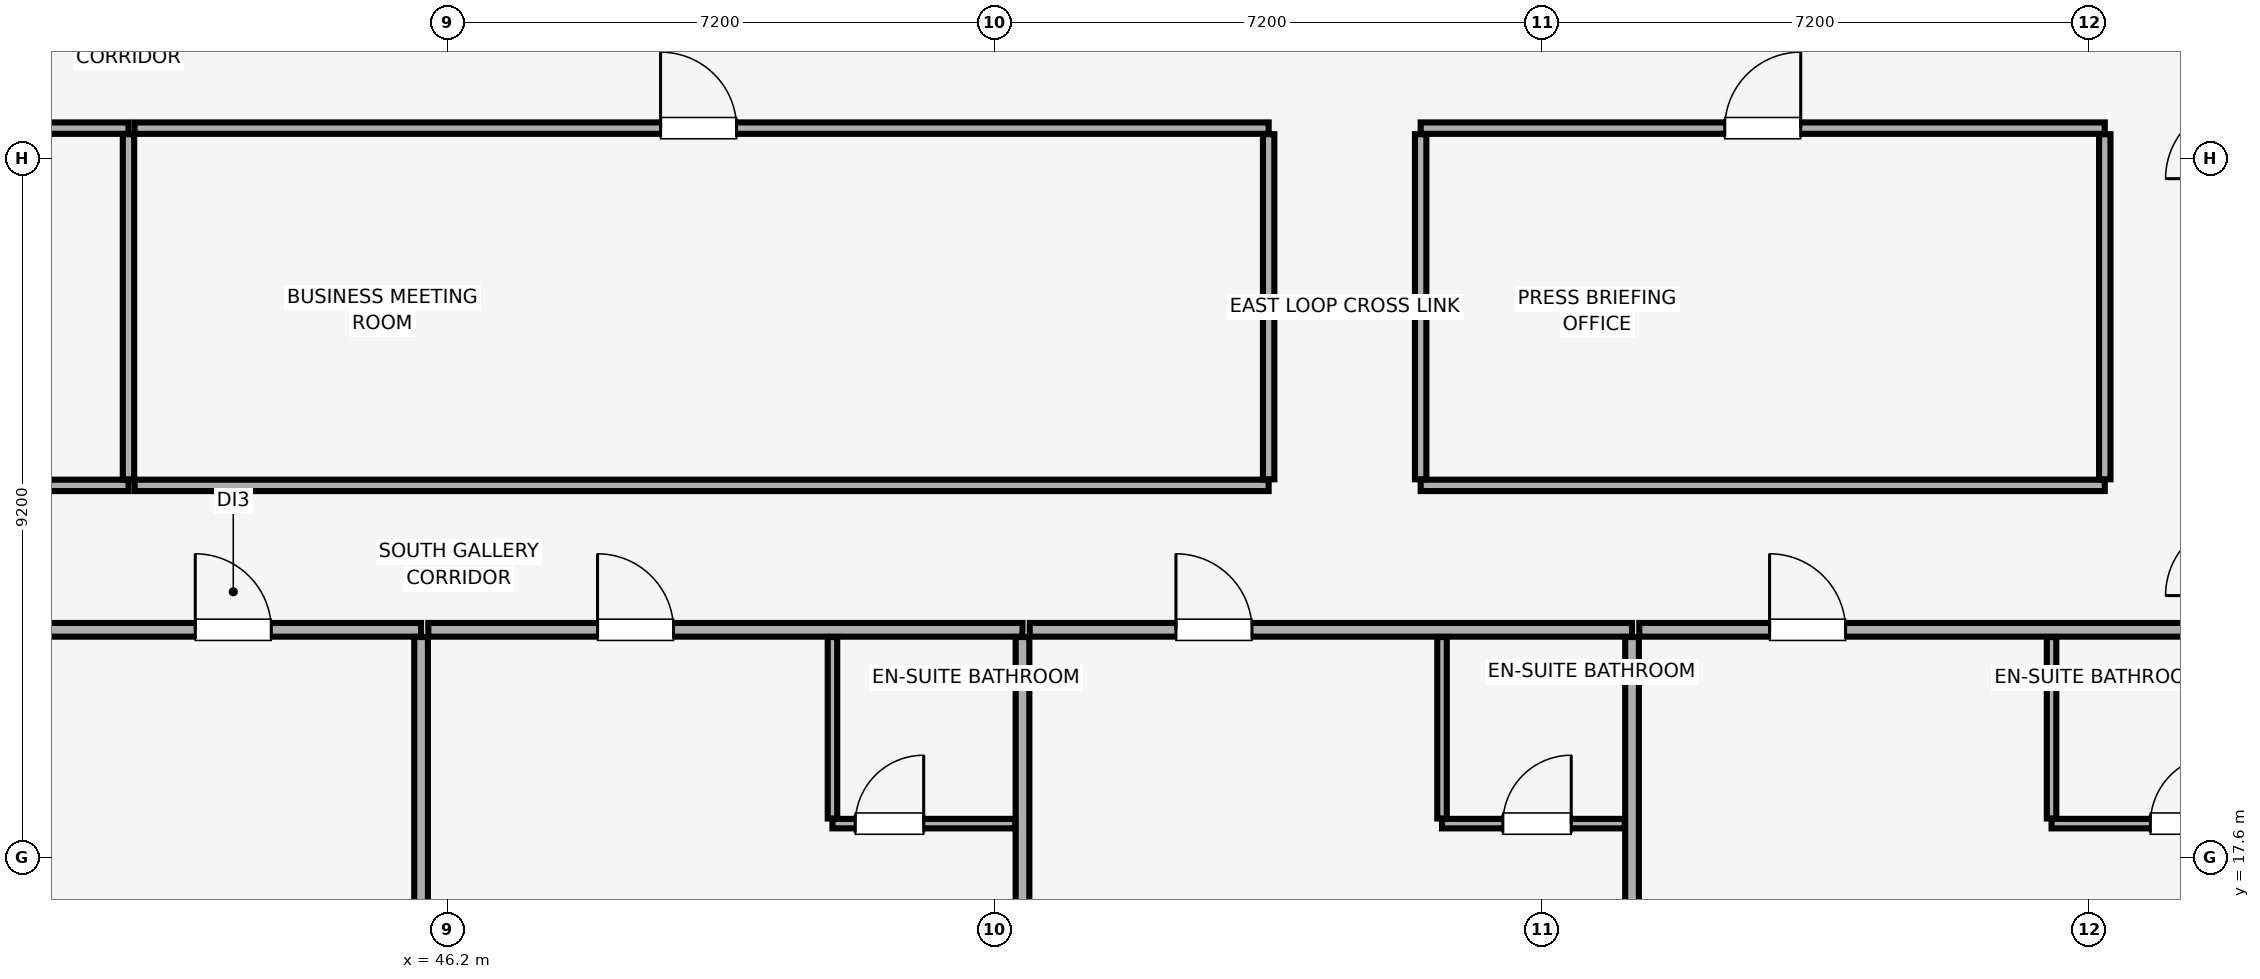
"""IFC4 building model, lengths in metres.
Left out: names, types, materials, properties, quantities, classifications, styles, units other than length and angle.
Written with IfcOpenShell. Run it as: python <this file> out.ifc"""

import sys

from ifc_helpers import new_model, si_unit, direction, frame, frame_2d, origin, place, context, subcontext, project, spatial, rectangle, extrude, element, fill, save


model = new_model("IFC4")
c1 = context("Model", 3, precision=1e-05, world=origin(), true_north=direction((0.0, 1.0)))
c2 = subcontext(c1, "Body", "Model", "MODEL_VIEW")
j1 = project(units=[si_unit("LENGTHUNIT", "METRE"), si_unit("PLANEANGLEUNIT", "RADIAN")], contexts=[c1])
p1 = place(None, origin())
s1 = spatial("IfcSite", under=j1, at=p1, CompositionType="ELEMENT")
p2 = place(p1, origin())
s2 = spatial("IfcBuilding", under=s1, at=p2, CompositionType="ELEMENT")
p3 = place(p2, frame((0.0, 0.0, 180.95)))
s3 = spatial("IfcBuildingStorey", under=s2, at=p3, CompositionType="ELEMENT", Elevation=180.95)
p4 = place(p3, frame((38.032, 20.6, 0.0), z_axis=(0.0, 0.0, 1.0), x_axis=(1.0, 0.0, 0.0)))
e1 = element("IfcWall", 1, at=p4, inside=s3, PredefinedType="PARTITIONING", context=c2, shape_type="SweptSolid", body=[
    extrude(rectangle(XDim=7.817, YDim=0.18, at=frame_2d((3.909, 0.0))), origin(), (0.0, 0.0, 1.0), 3.45),
])
p5 = place(p4, frame((4.847, 0.0, 0.0)))
e2 = element("IfcOpeningElement", 2, at=p5, cuts=e1, PredefinedType="OPENING", context=c2, shape_type="SweptSolid", body=[
    extrude(rectangle(XDim=1.0, YDim=2.15, at=frame_2d((0.5, 1.075))), frame((0.0, 0.1, 0.0), z_axis=(0.0, -1.0, 0.0), x_axis=(1.0, 0.0, 0.0)), (0.0, 0.0, 1.0), 0.2),
])
p6 = place(p3, frame((45.849, 3.15, 0.0), z_axis=(0.0, 0.0, 1.0), x_axis=(0.0, 1.0, 0.0)))
e3 = element("IfcWall", 3, at=p6, inside=s3, PredefinedType="PARTITIONING", context=c2, shape_type="SweptSolid", body=[
    extrude(rectangle(XDim=17.355, YDim=0.18, at=frame_2d((8.677, 0.0))), origin(), (0.0, 0.0, 1.0), 3.45),
])
p7 = place(p3, frame((45.944, 20.6, 0.0), z_axis=(0.0, 0.0, 1.0), x_axis=(1.0, 0.0, 0.0)))
e4 = element("IfcWall", 4, at=p7, inside=s3, PredefinedType="PARTITIONING", context=c2, shape_type="SweptSolid", body=[
    extrude(rectangle(XDim=7.817, YDim=0.18, at=frame_2d((3.909, 0.0))), origin(), (0.0, 0.0, 1.0), 3.45),
])
p8 = place(p7, frame((2.227, 0.0, 0.0)))
e5 = element("IfcOpeningElement", 5, at=p8, cuts=e4, PredefinedType="OPENING", context=c2, shape_type="SweptSolid", body=[
    extrude(rectangle(XDim=1.0, YDim=2.15, at=frame_2d((0.5, 1.075))), frame((0.0, 0.1, 0.0), z_axis=(0.0, -1.0, 0.0), x_axis=(1.0, 0.0, 0.0)), (0.0, 0.0, 1.0), 0.2),
])
p9 = place(p3, frame((53.761, 3.15, 0.0), z_axis=(0.0, 0.0, 1.0), x_axis=(0.0, 1.0, 0.0)))
e6 = element("IfcWall", 6, at=p9, inside=s3, PredefinedType="PARTITIONING", context=c2, shape_type="SweptSolid", body=[
    extrude(rectangle(XDim=17.355, YDim=0.18, at=frame_2d((8.677, 0.0))), origin(), (0.0, 0.0, 1.0), 3.45),
])
p10 = place(p3, frame((51.261, 18.05, 0.0), z_axis=(0.0, 0.0, 1.0), x_axis=(1.0, 0.0, 0.0)))
e7 = element("IfcWall", 7, at=p10, inside=s3, PredefinedType="PARTITIONING", context=c2, shape_type="SweptSolid", body=[
    extrude(rectangle(XDim=2.405, YDim=0.125, at=frame_2d((1.203, 0.0))), origin(), (0.0, 0.0, 1.0), 3.45),
])
p11 = place(p10, frame((0.3, 0.0, 0.0)))
e8 = element("IfcOpeningElement", 8, at=p11, cuts=e7, PredefinedType="OPENING", context=c2, shape_type="SweptSolid", body=[
    extrude(rectangle(XDim=0.9, YDim=2.1, at=frame_2d((0.45, 1.05))), frame((0.0, 0.073, 0.0), z_axis=(0.0, -1.0, 0.0), x_axis=(1.0, 0.0, 0.0)), (0.0, 0.0, 1.0), 0.145),
])
p12 = place(p3, frame((51.261, 18.117, 0.0), z_axis=(0.0, 0.0, 1.0), x_axis=(0.0, 1.0, 0.0)))
e9 = element("IfcWall", 9, at=p12, inside=s3, PredefinedType="PARTITIONING", context=c2, shape_type="SweptSolid", body=[
    extrude(rectangle(XDim=2.387, YDim=0.125, at=frame_2d((1.194, 0.0))), origin(), (0.0, 0.0, 1.0), 3.45),
])
p13 = place(p3, frame((53.856, 20.6, 0.0), z_axis=(0.0, 0.0, 1.0), x_axis=(1.0, 0.0, 0.0)))
e10 = element("IfcWall", 10, at=p13, inside=s3, PredefinedType="PARTITIONING", context=c2, shape_type="SweptSolid", body=[
    extrude(rectangle(XDim=7.924, YDim=0.18, at=frame_2d((3.962, 0.0))), origin(), (0.0, 0.0, 1.0), 3.45),
])
p14 = place(p13, frame((1.924, 0.0, 0.0)))
e11 = element("IfcOpeningElement", 11, at=p14, cuts=e10, PredefinedType="OPENING", context=c2, shape_type="SweptSolid", body=[
    extrude(rectangle(XDim=1.0, YDim=2.15, at=frame_2d((0.5, 1.075))), frame((0.0, 0.1, 0.0), z_axis=(0.0, -1.0, 0.0), x_axis=(1.0, 0.0, 0.0)), (0.0, 0.0, 1.0), 0.2),
])
p15 = place(p3, frame((61.781, 3.15, 0.0), z_axis=(0.0, 0.0, 1.0), x_axis=(0.0, 1.0, 0.0)))
e12 = element("IfcWall", 12, at=p15, inside=s3, PredefinedType="PARTITIONING", context=c2, shape_type="SweptSolid", body=[
    extrude(rectangle(XDim=17.355, YDim=0.18, at=frame_2d((8.677, 0.0))), origin(), (0.0, 0.0, 1.0), 3.45),
])
p16 = place(p3, frame((59.281, 18.05, 0.0), z_axis=(0.0, 0.0, 1.0), x_axis=(1.0, 0.0, 0.0)))
e13 = element("IfcWall", 13, at=p16, inside=s3, PredefinedType="PARTITIONING", context=c2, shape_type="SweptSolid", body=[
    extrude(rectangle(XDim=2.405, YDim=0.125, at=frame_2d((1.203, 0.0))), origin(), (0.0, 0.0, 1.0), 3.45),
])
p17 = place(p16, frame((0.8, 0.0, 0.0)))
e14 = element("IfcOpeningElement", 14, at=p17, cuts=e13, PredefinedType="OPENING", context=c2, shape_type="SweptSolid", body=[
    extrude(rectangle(XDim=0.9, YDim=2.1, at=frame_2d((0.45, 1.05))), frame((0.0, 0.073, 0.0), z_axis=(0.0, -1.0, 0.0), x_axis=(1.0, 0.0, 0.0)), (0.0, 0.0, 1.0), 0.145),
])
p18 = place(p3, frame((59.281, 18.117, 0.0), z_axis=(0.0, 0.0, 1.0), x_axis=(0.0, 1.0, 0.0)))
e15 = element("IfcWall", 15, at=p18, inside=s3, PredefinedType="PARTITIONING", context=c2, shape_type="SweptSolid", body=[
    extrude(rectangle(XDim=2.387, YDim=0.125, at=frame_2d((1.194, 0.0))), origin(), (0.0, 0.0, 1.0), 3.45),
])
p19 = place(p3, frame((61.876, 20.6, 0.0), z_axis=(0.0, 0.0, 1.0), x_axis=(1.0, 0.0, 0.0)))
e16 = element("IfcWall", 16, at=p19, inside=s3, PredefinedType="PARTITIONING", context=c2, shape_type="SweptSolid", body=[
    extrude(rectangle(XDim=7.924, YDim=0.18, at=frame_2d((3.962, 0.0))), origin(), (0.0, 0.0, 1.0), 3.45),
])
p20 = place(p19, frame((1.715, 0.0, 0.0)))
e17 = element("IfcOpeningElement", 17, at=p20, cuts=e16, PredefinedType="OPENING", context=c2, shape_type="SweptSolid", body=[
    extrude(rectangle(XDim=1.0, YDim=2.15, at=frame_2d((0.5, 1.075))), frame((0.0, 0.1, 0.0), z_axis=(0.0, -1.0, 0.0), x_axis=(1.0, 0.0, 0.0)), (0.0, 0.0, 1.0), 0.2),
])
p21 = place(p3, frame((67.3, 18.05, 0.0), z_axis=(0.0, 0.0, 1.0), x_axis=(1.0, 0.0, 0.0)))
e18 = element("IfcWall", 18, at=p21, inside=s3, PredefinedType="PARTITIONING", context=c2, shape_type="SweptSolid", body=[
    extrude(rectangle(XDim=2.405, YDim=0.125, at=frame_2d((1.203, 0.0))), origin(), (0.0, 0.0, 1.0), 3.45),
])
p22 = place(p21, frame((1.3, 0.0, 0.0)))
e19 = element("IfcOpeningElement", 19, at=p22, cuts=e18, PredefinedType="OPENING", context=c2, shape_type="SweptSolid", body=[
    extrude(rectangle(XDim=0.9, YDim=2.1, at=frame_2d((0.45, 1.05))), frame((0.0, 0.073, 0.0), z_axis=(0.0, -1.0, 0.0), x_axis=(1.0, 0.0, 0.0)), (0.0, 0.0, 1.0), 0.145),
])
p23 = place(p3, frame((67.3, 18.117, 0.0), z_axis=(0.0, 0.0, 1.0), x_axis=(0.0, 1.0, 0.0)))
e20 = element("IfcWall", 20, at=p23, inside=s3, PredefinedType="PARTITIONING", context=c2, shape_type="SweptSolid", body=[
    extrude(rectangle(XDim=2.387, YDim=0.125, at=frame_2d((1.194, 0.0))), origin(), (0.0, 0.0, 1.0), 3.45),
])
p24 = place(p3, frame((27.0, 22.5, 0.0), z_axis=(0.0, 0.0, 1.0), x_axis=(1.0, 0.0, 0.0)))
e21 = element("IfcWall", 21, at=p24, inside=s3, PredefinedType="PARTITIONING", context=c2, shape_type="SweptSolid", body=[
    extrude(rectangle(XDim=15.0, YDim=0.15, at=frame_2d((7.5, 0.0))), origin(), (0.0, 0.0, 1.0), 3.45),
])
p25 = place(p3, frame((27.0, 27.2, 0.0), z_axis=(0.0, 0.0, 1.0), x_axis=(1.0, 0.0, 0.0)))
e22 = element("IfcWall", 22, at=p25, inside=s3, PredefinedType="PARTITIONING", context=c2, shape_type="SweptSolid", body=[
    extrude(rectangle(XDim=15.0, YDim=0.15, at=frame_2d((7.5, 0.0))), origin(), (0.0, 0.0, 1.0), 3.45),
])
p26 = place(p25, frame((7.0, 0.0, 0.0)))
e23 = element("IfcOpeningElement", 23, at=p26, cuts=e22, PredefinedType="OPENING", context=c2, shape_type="SweptSolid", body=[
    extrude(rectangle(XDim=1.0, YDim=2.15, at=frame_2d((0.5, 1.075))), frame((0.0, 0.085, 0.0), z_axis=(0.0, -1.0, 0.0), x_axis=(1.0, 0.0, 0.0)), (0.0, 0.0, 1.0), 0.17),
])
p27 = place(p3, frame((42.0, 22.58, 0.0), z_axis=(0.0, 0.0, 1.0), x_axis=(0.0, 1.0, 0.0)))
e24 = element("IfcWall", 24, at=p27, inside=s3, PredefinedType="PARTITIONING", context=c2, shape_type="SweptSolid", body=[
    extrude(rectangle(XDim=4.54, YDim=0.15, at=frame_2d((2.27, 0.0))), origin(), (0.0, 0.0, 1.0), 2.95),
])
p28 = place(p3, frame((42.08, 22.5, 0.0), z_axis=(0.0, 0.0, 1.0), x_axis=(1.0, 0.0, 0.0)))
e25 = element("IfcWall", 25, at=p28, inside=s3, PredefinedType="PARTITIONING", context=c2, shape_type="SweptSolid", body=[
    extrude(rectangle(XDim=14.92, YDim=0.15, at=frame_2d((7.46, 0.0))), origin(), (0.0, 0.0, 1.0), 3.45),
])
p29 = place(p3, frame((42.08, 27.2, 0.0), z_axis=(0.0, 0.0, 1.0), x_axis=(1.0, 0.0, 0.0)))
e26 = element("IfcWall", 26, at=p29, inside=s3, PredefinedType="PARTITIONING", context=c2, shape_type="SweptSolid", body=[
    extrude(rectangle(XDim=14.92, YDim=0.15, at=frame_2d((7.46, 0.0))), origin(), (0.0, 0.0, 1.0), 3.45),
])
p30 = place(p29, frame((6.92, 0.0, 0.0)))
e27 = element("IfcOpeningElement", 27, at=p30, cuts=e26, PredefinedType="OPENING", context=c2, shape_type="SweptSolid", body=[
    extrude(rectangle(XDim=1.0, YDim=2.15, at=frame_2d((0.5, 1.075))), frame((0.0, 0.085, 0.0), z_axis=(0.0, -1.0, 0.0), x_axis=(1.0, 0.0, 0.0)), (0.0, 0.0, 1.0), 0.17),
])
p31 = place(p3, frame((57.0, 22.58, 0.0), z_axis=(0.0, 0.0, 1.0), x_axis=(0.0, 1.0, 0.0)))
e28 = element("IfcWall", 28, at=p31, inside=s3, PredefinedType="PARTITIONING", context=c2, shape_type="SweptSolid", body=[
    extrude(rectangle(XDim=4.54, YDim=0.15, at=frame_2d((2.27, 0.0))), origin(), (0.0, 0.0, 1.0), 2.95),
])
p32 = place(p3, frame((59.0, 22.5, 0.0), z_axis=(0.0, 0.0, 1.0), x_axis=(1.0, 0.0, 0.0)))
e29 = element("IfcWall", 29, at=p32, inside=s3, PredefinedType="PARTITIONING", context=c2, shape_type="SweptSolid", body=[
    extrude(rectangle(XDim=9.0, YDim=0.15, at=frame_2d((4.5, 0.0))), origin(), (0.0, 0.0, 1.0), 3.45),
])
p33 = place(p3, frame((59.0, 27.2, 0.0), z_axis=(0.0, 0.0, 1.0), x_axis=(1.0, 0.0, 0.0)))
e30 = element("IfcWall", 30, at=p33, inside=s3, PredefinedType="PARTITIONING", context=c2, shape_type="SweptSolid", body=[
    extrude(rectangle(XDim=9.0, YDim=0.15, at=frame_2d((4.5, 0.0))), origin(), (0.0, 0.0, 1.0), 3.45),
])
p34 = place(p33, frame((4.0, 0.0, 0.0)))
e31 = element("IfcOpeningElement", 31, at=p34, cuts=e30, PredefinedType="OPENING", context=c2, shape_type="SweptSolid", body=[
    extrude(rectangle(XDim=1.0, YDim=2.15, at=frame_2d((0.5, 1.075))), frame((0.0, 0.085, 0.0), z_axis=(0.0, -1.0, 0.0), x_axis=(1.0, 0.0, 0.0)), (0.0, 0.0, 1.0), 0.17),
])
p35 = place(p3, frame((59.0, 22.58, 0.0), z_axis=(0.0, 0.0, 1.0), x_axis=(0.0, 1.0, 0.0)))
e32 = element("IfcWall", 32, at=p35, inside=s3, PredefinedType="PARTITIONING", context=c2, shape_type="SweptSolid", body=[
    extrude(rectangle(XDim=4.54, YDim=0.15, at=frame_2d((2.27, 0.0))), origin(), (0.0, 0.0, 1.0), 3.45),
])
p36 = place(p3, frame((68.0, 22.58, 0.0), z_axis=(0.0, 0.0, 1.0), x_axis=(0.0, 1.0, 0.0)))
e33 = element("IfcWall", 33, at=p36, inside=s3, PredefinedType="PARTITIONING", context=c2, shape_type="SweptSolid", body=[
    extrude(rectangle(XDim=4.54, YDim=0.15, at=frame_2d((2.27, 0.0))), origin(), (0.0, 0.0, 1.0), 2.95),
])
p37 = place(p5, origin())
e34 = element("IfcDoor", 34, at=p37, inside=s3, OperationType="SINGLE_SWING_LEFT", PredefinedType="DOOR", context=c2, shape_type="SweptSolid", body=[
    extrude(rectangle(XDim=1.0, YDim=2.15, at=frame_2d((0.5, 1.075))), frame((0.0, 0.025, 0.0), z_axis=(0.0, -1.0, 0.0), x_axis=(1.0, 0.0, 0.0)), (0.0, 0.0, 1.0), 0.05),
])
fill(e2, e34)
p38 = place(p8, origin())
e35 = element("IfcDoor", 35, at=p38, inside=s3, OperationType="SINGLE_SWING_LEFT", PredefinedType="DOOR", context=c2, shape_type="SweptSolid", body=[
    extrude(rectangle(XDim=1.0, YDim=2.15, at=frame_2d((0.5, 1.075))), frame((0.0, 0.025, 0.0), z_axis=(0.0, -1.0, 0.0), x_axis=(1.0, 0.0, 0.0)), (0.0, 0.0, 1.0), 0.05),
])
fill(e5, e35)
p39 = place(p11, origin())
e36 = element("IfcDoor", 36, at=p39, inside=s3, OperationType="SINGLE_SWING_RIGHT", PredefinedType="DOOR", context=c2, shape_type="SweptSolid", body=[
    extrude(rectangle(XDim=0.9, YDim=2.1, at=frame_2d((0.45, 1.05))), frame((0.0, 0.025, 0.0), z_axis=(0.0, -1.0, 0.0), x_axis=(1.0, 0.0, 0.0)), (0.0, 0.0, 1.0), 0.05),
])
fill(e8, e36)
p40 = place(p14, origin())
e37 = element("IfcDoor", 37, at=p40, inside=s3, OperationType="SINGLE_SWING_LEFT", PredefinedType="DOOR", context=c2, shape_type="SweptSolid", body=[
    extrude(rectangle(XDim=1.0, YDim=2.15, at=frame_2d((0.5, 1.075))), frame((0.0, 0.025, 0.0), z_axis=(0.0, -1.0, 0.0), x_axis=(1.0, 0.0, 0.0)), (0.0, 0.0, 1.0), 0.05),
])
fill(e11, e37)
p41 = place(p17, origin())
e38 = element("IfcDoor", 38, at=p41, inside=s3, OperationType="SINGLE_SWING_RIGHT", PredefinedType="DOOR", context=c2, shape_type="SweptSolid", body=[
    extrude(rectangle(XDim=0.9, YDim=2.1, at=frame_2d((0.45, 1.05))), frame((0.0, 0.025, 0.0), z_axis=(0.0, -1.0, 0.0), x_axis=(1.0, 0.0, 0.0)), (0.0, 0.0, 1.0), 0.05),
])
fill(e14, e38)
p42 = place(p20, origin())
e39 = element("IfcDoor", 39, at=p42, inside=s3, OperationType="SINGLE_SWING_LEFT", PredefinedType="DOOR", context=c2, shape_type="SweptSolid", body=[
    extrude(rectangle(XDim=1.0, YDim=2.15, at=frame_2d((0.5, 1.075))), frame((0.0, 0.025, 0.0), z_axis=(0.0, -1.0, 0.0), x_axis=(1.0, 0.0, 0.0)), (0.0, 0.0, 1.0), 0.05),
])
fill(e17, e39)
p43 = place(p22, origin())
e40 = element("IfcDoor", 40, at=p43, inside=s3, OperationType="SINGLE_SWING_RIGHT", PredefinedType="DOOR", context=c2, shape_type="SweptSolid", body=[
    extrude(rectangle(XDim=0.9, YDim=2.1, at=frame_2d((0.45, 1.05))), frame((0.0, 0.025, 0.0), z_axis=(0.0, -1.0, 0.0), x_axis=(1.0, 0.0, 0.0)), (0.0, 0.0, 1.0), 0.05),
])
fill(e19, e40)
p44 = place(p30, origin())
e41 = element("IfcDoor", 41, at=p44, inside=s3, OperationType="SINGLE_SWING_LEFT", PredefinedType="DOOR", context=c2, shape_type="SweptSolid", body=[
    extrude(rectangle(XDim=1.0, YDim=2.15, at=frame_2d((0.5, 1.075))), frame((0.0, 0.025, 0.0), z_axis=(0.0, -1.0, 0.0), x_axis=(1.0, 0.0, 0.0)), (0.0, 0.0, 1.0), 0.05),
])
fill(e27, e41)
p45 = place(p34, origin())
e42 = element("IfcDoor", 42, at=p45, inside=s3, OperationType="SINGLE_SWING_RIGHT", PredefinedType="DOOR", context=c2, shape_type="SweptSolid", body=[
    extrude(rectangle(XDim=1.0, YDim=2.15, at=frame_2d((0.5, 1.075))), frame((0.0, 0.025, 0.0), z_axis=(0.0, -1.0, 0.0), x_axis=(1.0, 0.0, 0.0)), (0.0, 0.0, 1.0), 0.05),
])
fill(e31, e42)
save(model, sys.argv[1])
